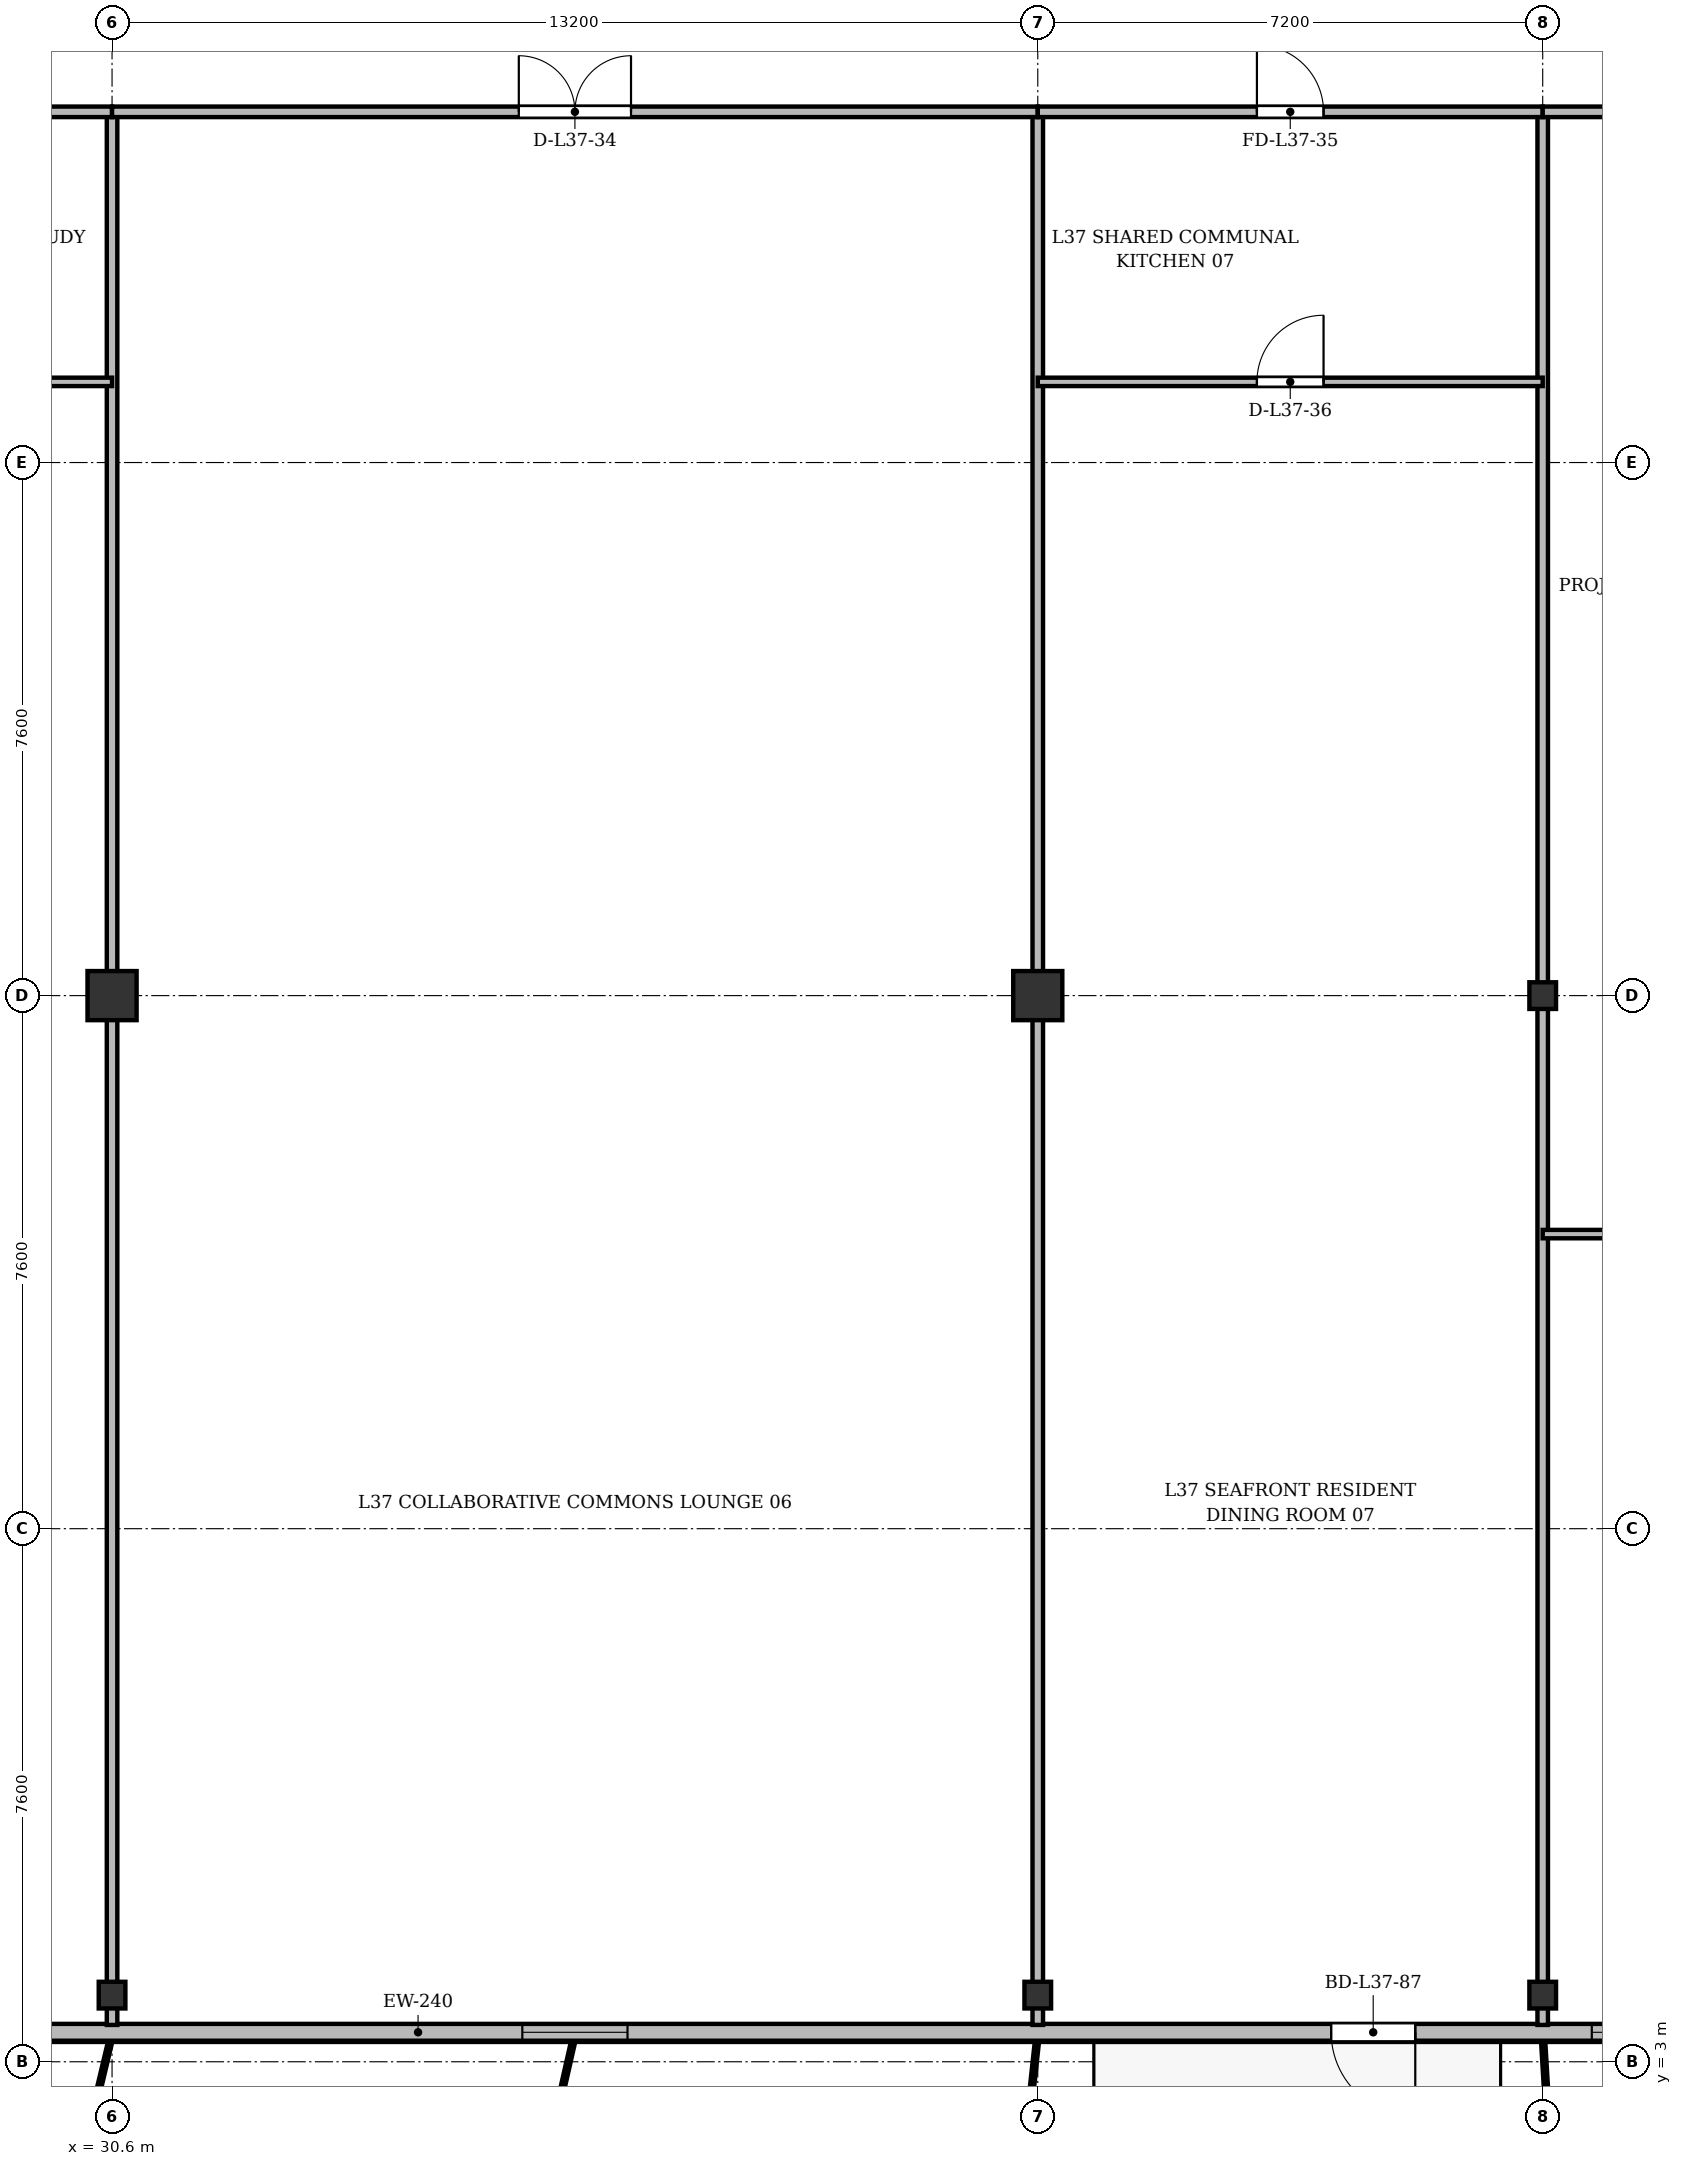
"""IFC4 building model, lengths in metres.
Left out: names, types, materials, properties, quantities, classifications, styles, units other than length and angle.
Written with IfcOpenShell. Run it as: python <this file> out.ifc"""

import sys

from ifc_helpers import new_model, si_unit, direction, frame, frame_2d, origin, origin_2d, place, context, subcontext, project, spatial, rectangle, i_section, extrude, source, transform, mapped, element, fill, save


model = new_model("IFC4")
c1 = context("Model", 3, precision=1e-05, world=origin(), true_north=direction((0.0, 1.0)))
c2 = subcontext(c1, "Body", "Model", "MODEL_VIEW")
j1 = project(units=[si_unit("LENGTHUNIT", "METRE"), si_unit("PLANEANGLEUNIT", "RADIAN")], contexts=[c1])
p1 = place(None, origin())
s1 = spatial("IfcSite", under=j1, at=p1, CompositionType="ELEMENT")
p2 = place(p1, origin())
s2 = spatial("IfcBuilding", under=s1, at=p2, CompositionType="ELEMENT")
p3 = place(p2, frame((0.0, 0.0, 142.9)))
s3 = spatial("IfcBuildingStorey", under=s2, at=p3, CompositionType="ELEMENT", Elevation=142.9)
m1 = source(origin(), c2, "Body", "SweptSolid", [
    extrude(i_section(OverallWidth=0.38, OverallDepth=0.38, WebThickness=0.02, FlangeThickness=0.03, at=origin_2d()), origin(), (0.0, 0.0, 1.0), 3.6),
])
p4 = place(p3, frame((30.6, 3.95, 0.0), z_axis=(0.0, 0.0, 1.0), x_axis=(1.0, 0.0, 0.0)))
e1 = element("IfcColumn", 1, at=p4, inside=s3, PredefinedType="COLUMN", context=c2, shape_type="MappedRepresentation", body=[
    mapped(m1, transform((0.0, 0.0, 0.0), x_axis=(1.0, 0.0, 0.0), y_axis=(0.0, 1.0, 0.0), z_axis=(0.0, 0.0, 1.0), scale=1.0)),
])
m2 = source(origin(), c2, "Body", "SweptSolid", [
    extrude(rectangle(XDim=0.7, YDim=0.7, at=origin_2d()), origin(), (0.0, 0.0, 1.0), 3.6),
])
p5 = place(p3, frame((30.6, 18.2, 0.0), z_axis=(0.0, 0.0, 1.0), x_axis=(1.0, 0.0, 0.0)))
e2 = element("IfcColumn", 2, at=p5, inside=s3, PredefinedType="COLUMN", context=c2, shape_type="MappedRepresentation", body=[
    mapped(m2, transform((0.0, 0.0, 0.0), x_axis=(1.0, 0.0, 0.0), y_axis=(0.0, 1.0, 0.0), z_axis=(0.0, 0.0, 1.0), scale=1.0)),
])
p6 = place(p3, frame((43.8, 3.95, 0.0), z_axis=(0.0, 0.0, 1.0), x_axis=(1.0, 0.0, 0.0)))
e3 = element("IfcColumn", 3, at=p6, inside=s3, PredefinedType="COLUMN", context=c2, shape_type="MappedRepresentation", body=[
    mapped(m1, transform((0.0, 0.0, 0.0), x_axis=(1.0, 0.0, 0.0), y_axis=(0.0, 1.0, 0.0), z_axis=(0.0, 0.0, 1.0), scale=1.0)),
])
p7 = place(p3, frame((43.8, 18.2, 0.0), z_axis=(0.0, 0.0, 1.0), x_axis=(1.0, 0.0, 0.0)))
e4 = element("IfcColumn", 4, at=p7, inside=s3, PredefinedType="COLUMN", context=c2, shape_type="MappedRepresentation", body=[
    mapped(m2, transform((0.0, 0.0, 0.0), x_axis=(1.0, 0.0, 0.0), y_axis=(0.0, 1.0, 0.0), z_axis=(0.0, 0.0, 1.0), scale=1.0)),
])
for number, where, z_axis, x_axis in (
    (5, (51.0, 3.95, 0.0), (0.0, 0.0, 1.0), (1.0, 0.0, 0.0)),
    (6, (51.0, 18.2, 0.0), (0.0, 0.0, 1.0), (1.0, 0.0, 0.0)),
):
    element("IfcColumn", number, at=place(p3, frame(where, z_axis=z_axis, x_axis=x_axis)), inside=s3, PredefinedType="COLUMN", context=c2, shape_type="MappedRepresentation", body=[
        mapped(m1, transform((0.0, 0.0, 0.0), x_axis=(1.0, 0.0, 0.0), y_axis=(0.0, 1.0, 0.0), z_axis=(0.0, 0.0, 1.0), scale=1.0)),
    ])
p8 = place(p3, frame((63.6, 3.42, 0.0), z_axis=(0.0, 0.0, 1.0), x_axis=(-1.0, 0.0, 0.0)))
e7 = element("IfcWall", 7, at=p8, inside=s3, PredefinedType="SOLIDWALL", context=c2, shape_type="SweptSolid", body=[
    extrude(rectangle(XDim=52.8, YDim=0.24, at=frame_2d((26.4, 0.0))), origin(), (0.0, 0.0, 1.0), 3.35),
])
p9 = place(p8, frame((1.695, 0.0, 0.9)))
e8 = element("IfcOpeningElement", 8, at=p9, cuts=e7, PredefinedType="OPENING", context=c2, shape_type="SweptSolid", body=[
    extrude(rectangle(XDim=1.5, YDim=1.75, at=frame_2d((0.75, 0.875))), frame((0.0, 0.13, 0.0), z_axis=(0.0, -1.0, 0.0), x_axis=(1.0, 0.0, 0.0)), (0.0, 0.0, 1.0), 0.26),
])
p10 = place(p8, frame((5.1, 0.0, 0.9)))
e9 = element("IfcOpeningElement", 9, at=p10, cuts=e7, PredefinedType="OPENING", context=c2, shape_type="SweptSolid", body=[
    extrude(rectangle(XDim=2.0, YDim=1.95, at=frame_2d((1.0, 0.975))), frame((0.0, 0.13, 0.0), z_axis=(0.0, -1.0, 0.0), x_axis=(1.0, 0.0, 0.0)), (0.0, 0.0, 1.0), 0.26),
])
p11 = place(p8, frame((7.65, 0.0, 0.9)))
e10 = element("IfcOpeningElement", 10, at=p11, cuts=e7, PredefinedType="OPENING", context=c2, shape_type="SweptSolid", body=[
    extrude(rectangle(XDim=1.5, YDim=1.75, at=frame_2d((0.75, 0.875))), frame((0.0, 0.13, 0.0), z_axis=(0.0, -1.0, 0.0), x_axis=(1.0, 0.0, 0.0)), (0.0, 0.0, 1.0), 0.26),
])
p12 = place(p8, frame((10.1, 0.0, 0.9)))
e11 = element("IfcOpeningElement", 11, at=p12, cuts=e7, PredefinedType="OPENING", context=c2, shape_type="SweptSolid", body=[
    extrude(rectangle(XDim=1.8, YDim=1.8, at=frame_2d((0.9, 0.9))), frame((0.0, 0.13, 0.0), z_axis=(0.0, -1.0, 0.0), x_axis=(1.0, 0.0, 0.0)), (0.0, 0.0, 1.0), 0.26),
])
p13 = place(p8, frame((14.417, 0.0, 0.0)))
e12 = element("IfcOpeningElement", 12, at=p13, cuts=e7, PredefinedType="OPENING", context=c2, shape_type="SweptSolid", body=[
    extrude(rectangle(XDim=1.2, YDim=2.2, at=frame_2d((0.6, 1.1))), frame((0.0, 0.13, 0.0), z_axis=(0.0, -1.0, 0.0), x_axis=(1.0, 0.0, 0.0)), (0.0, 0.0, 1.0), 0.26),
])
p14 = place(p8, frame((25.65, 0.0, 0.9)))
e13 = element("IfcOpeningElement", 13, at=p14, cuts=e7, PredefinedType="OPENING", context=c2, shape_type="SweptSolid", body=[
    extrude(rectangle(XDim=1.5, YDim=1.75, at=frame_2d((0.75, 0.875))), frame((0.0, 0.13, 0.0), z_axis=(0.0, -1.0, 0.0), x_axis=(1.0, 0.0, 0.0)), (0.0, 0.0, 1.0), 0.26),
])
p15 = place(p8, frame((35.6, 0.0, 0.9)))
e14 = element("IfcOpeningElement", 14, at=p15, cuts=e7, PredefinedType="OPENING", context=c2, shape_type="SweptSolid", body=[
    extrude(rectangle(XDim=2.0, YDim=1.95, at=frame_2d((1.0, 0.975))), frame((0.0, 0.13, 0.0), z_axis=(0.0, -1.0, 0.0), x_axis=(1.0, 0.0, 0.0)), (0.0, 0.0, 1.0), 0.26),
])
p16 = place(p8, frame((41.656, 0.0, 0.0)))
e15 = element("IfcOpeningElement", 15, at=p16, cuts=e7, PredefinedType="OPENING", context=c2, shape_type="SweptSolid", body=[
    extrude(rectangle(XDim=1.2, YDim=2.2, at=frame_2d((0.6, 1.1))), frame((0.0, 0.13, 0.0), z_axis=(0.0, -1.0, 0.0), x_axis=(1.0, 0.0, 0.0)), (0.0, 0.0, 1.0), 0.26),
])
p17 = place(p8, frame((43.65, 0.0, 0.9)))
e16 = element("IfcOpeningElement", 16, at=p17, cuts=e7, PredefinedType="OPENING", context=c2, shape_type="SweptSolid", body=[
    extrude(rectangle(XDim=1.5, YDim=1.75, at=frame_2d((0.75, 0.875))), frame((0.0, 0.13, 0.0), z_axis=(0.0, -1.0, 0.0), x_axis=(1.0, 0.0, 0.0)), (0.0, 0.0, 1.0), 0.26),
])
p18 = place(p8, frame((45.95, 0.0, 0.9)))
e17 = element("IfcOpeningElement", 17, at=p18, cuts=e7, PredefinedType="OPENING", context=c2, shape_type="SweptSolid", body=[
    extrude(rectangle(XDim=1.5, YDim=1.75, at=frame_2d((0.75, 0.875))), frame((0.0, 0.13, 0.0), z_axis=(0.0, -1.0, 0.0), x_axis=(1.0, 0.0, 0.0)), (0.0, 0.0, 1.0), 0.26),
])
p19 = place(p8, frame((49.605, 0.0, 0.9)))
e18 = element("IfcOpeningElement", 18, at=p19, cuts=e7, PredefinedType="OPENING", context=c2, shape_type="SweptSolid", body=[
    extrude(rectangle(XDim=1.5, YDim=1.75, at=frame_2d((0.75, 0.875))), frame((0.0, 0.13, 0.0), z_axis=(0.0, -1.0, 0.0), x_axis=(1.0, 0.0, 0.0)), (0.0, 0.0, 1.0), 0.26),
])
for number, where, z_axis, x_axis in (
    (19, (30.6, 3.525, 0.0), (0.0, 0.0, 1.0), (0.0, 1.0, 0.0)),
    (20, (43.8, 3.525, 0.0), (0.0, 0.0, 1.0), (0.0, 1.0, 0.0)),
    (21, (51.0, 3.525, 0.0), (0.0, 0.0, 1.0), (0.0, 1.0, 0.0)),
):
    element("IfcWall", number, at=place(p3, frame(where, z_axis=z_axis, x_axis=x_axis)), inside=s3, PredefinedType="PARTITIONING", context=c2, shape_type="SweptSolid", body=[
        extrude(rectangle(XDim=27.275, YDim=0.15, at=frame_2d((13.638, 0.0))), origin(), (0.0, 0.0, 1.0), 2.85),
    ])
p20 = place(p3, frame((23.4, 30.8, 0.0), z_axis=(0.0, 0.0, 1.0), x_axis=(1.0, 0.0, 0.0)))
e22 = element("IfcWall", 22, at=p20, inside=s3, PredefinedType="PARTITIONING", context=c2, shape_type="SweptSolid", body=[
    extrude(rectangle(XDim=7.2, YDim=0.15, at=frame_2d((3.6, 0.0))), origin(), (0.0, 0.0, 1.0), 2.85),
])
p21 = place(p20, frame((3.125, 0.0, 0.0)))
e23 = element("IfcOpeningElement", 23, at=p21, cuts=e22, PredefinedType="OPENING", context=c2, shape_type="SweptSolid", body=[
    extrude(rectangle(XDim=0.95, YDim=2.15, at=frame_2d((0.475, 1.075))), frame((0.0, 0.085, 0.0), z_axis=(0.0, -1.0, 0.0), x_axis=(1.0, 0.0, 0.0)), (0.0, 0.0, 1.0), 0.17),
])
p22 = place(p3, frame((23.4, 26.95, 0.0), z_axis=(0.0, 0.0, 1.0), x_axis=(1.0, 0.0, 0.0)))
e24 = element("IfcWall", 24, at=p22, inside=s3, PredefinedType="PARTITIONING", context=c2, shape_type="SweptSolid", body=[
    extrude(rectangle(XDim=7.2, YDim=0.12, at=frame_2d((3.6, 0.0))), origin(), (0.0, 0.0, 1.0), 2.85),
])
p23 = place(p22, frame((3.125, 0.0, 0.0)))
e25 = element("IfcOpeningElement", 25, at=p23, cuts=e24, PredefinedType="OPENING", context=c2, shape_type="SweptSolid", body=[
    extrude(rectangle(XDim=0.95, YDim=2.15, at=frame_2d((0.475, 1.075))), frame((0.0, 0.07, 0.0), z_axis=(0.0, -1.0, 0.0), x_axis=(1.0, 0.0, 0.0)), (0.0, 0.0, 1.0), 0.14),
])
p24 = place(p3, frame((30.6, 30.8, 0.0), z_axis=(0.0, 0.0, 1.0), x_axis=(1.0, 0.0, 0.0)))
e26 = element("IfcWall", 26, at=p24, inside=s3, PredefinedType="PARTITIONING", context=c2, shape_type="SweptSolid", body=[
    extrude(rectangle(XDim=13.2, YDim=0.15, at=frame_2d((6.6, 0.0))), origin(), (0.0, 0.0, 1.0), 2.85),
])
p25 = place(p24, frame((5.8, 0.0, 0.0)))
e27 = element("IfcOpeningElement", 27, at=p25, cuts=e26, PredefinedType="OPENING", context=c2, shape_type="SweptSolid", body=[
    extrude(rectangle(XDim=1.6, YDim=2.2, at=frame_2d((0.8, 1.1))), frame((0.0, 0.085, 0.0), z_axis=(0.0, -1.0, 0.0), x_axis=(1.0, 0.0, 0.0)), (0.0, 0.0, 1.0), 0.17),
])
p26 = place(p3, frame((43.8, 30.8, 0.0), z_axis=(0.0, 0.0, 1.0), x_axis=(1.0, 0.0, 0.0)))
e28 = element("IfcWall", 28, at=p26, inside=s3, PredefinedType="PARTITIONING", context=c2, shape_type="SweptSolid", body=[
    extrude(rectangle(XDim=7.2, YDim=0.15, at=frame_2d((3.6, 0.0))), origin(), (0.0, 0.0, 1.0), 2.85),
])
p27 = place(p26, frame((3.125, 0.0, 0.0)))
e29 = element("IfcOpeningElement", 29, at=p27, cuts=e28, PredefinedType="OPENING", context=c2, shape_type="SweptSolid", body=[
    extrude(rectangle(XDim=0.95, YDim=2.15, at=frame_2d((0.475, 1.075))), frame((0.0, 0.085, 0.0), z_axis=(0.0, -1.0, 0.0), x_axis=(1.0, 0.0, 0.0)), (0.0, 0.0, 1.0), 0.17),
])
p28 = place(p3, frame((43.8, 26.95, 0.0), z_axis=(0.0, 0.0, 1.0), x_axis=(1.0, 0.0, 0.0)))
e30 = element("IfcWall", 30, at=p28, inside=s3, PredefinedType="PARTITIONING", context=c2, shape_type="SweptSolid", body=[
    extrude(rectangle(XDim=7.2, YDim=0.12, at=frame_2d((3.6, 0.0))), origin(), (0.0, 0.0, 1.0), 2.85),
])
p29 = place(p28, frame((3.125, 0.0, 0.0)))
e31 = element("IfcOpeningElement", 31, at=p29, cuts=e30, PredefinedType="OPENING", context=c2, shape_type="SweptSolid", body=[
    extrude(rectangle(XDim=0.95, YDim=2.15, at=frame_2d((0.475, 1.075))), frame((0.0, 0.07, 0.0), z_axis=(0.0, -1.0, 0.0), x_axis=(1.0, 0.0, 0.0)), (0.0, 0.0, 1.0), 0.14),
])
p30 = place(p3, frame((51.0, 30.8, 0.0), z_axis=(0.0, 0.0, 1.0), x_axis=(1.0, 0.0, 0.0)))
e32 = element("IfcWall", 32, at=p30, inside=s3, PredefinedType="PARTITIONING", context=c2, shape_type="SweptSolid", body=[
    extrude(rectangle(XDim=3.2, YDim=0.15, at=frame_2d((1.6, 0.0))), origin(), (0.0, 0.0, 1.0), 2.85),
])
p31 = place(p30, frame((1.125, 0.0, 0.0)))
e33 = element("IfcOpeningElement", 33, at=p31, cuts=e32, PredefinedType="OPENING", context=c2, shape_type="SweptSolid", body=[
    extrude(rectangle(XDim=0.95, YDim=2.15, at=frame_2d((0.475, 1.075))), frame((0.0, 0.085, 0.0), z_axis=(0.0, -1.0, 0.0), x_axis=(1.0, 0.0, 0.0)), (0.0, 0.0, 1.0), 0.17),
])
p32 = place(p3, frame((51.0, 14.8, 0.0), z_axis=(0.0, 0.0, 1.0), x_axis=(1.0, 0.0, 0.0)))
e34 = element("IfcWall", 34, at=p32, inside=s3, PredefinedType="PARTITIONING", context=c2, shape_type="SweptSolid", body=[
    extrude(rectangle(XDim=3.2, YDim=0.12, at=frame_2d((1.6, 0.0))), origin(), (0.0, 0.0, 1.0), 2.85),
])
p33 = place(p32, frame((1.125, 0.0, 0.0)))
e35 = element("IfcOpeningElement", 35, at=p33, cuts=e34, PredefinedType="OPENING", context=c2, shape_type="SweptSolid", body=[
    extrude(rectangle(XDim=0.95, YDim=2.15, at=frame_2d((0.475, 1.075))), frame((0.0, 0.07, 0.0), z_axis=(0.0, -1.0, 0.0), x_axis=(1.0, 0.0, 0.0)), (0.0, 0.0, 1.0), 0.14),
])
m3 = source(origin(), c2, "Body", "SweptSolid", [
    extrude(rectangle(XDim=1.8, YDim=1.8, at=frame_2d((0.9, 0.9))), frame((0.0, 0.03, 0.0), z_axis=(0.0, -1.0, 0.0), x_axis=(1.0, 0.0, 0.0)), (0.0, 0.0, 1.0), 0.06),
])
p34 = place(p12, origin())
e36 = element("IfcWindow", 36, at=p34, inside=s3, PartitioningType="SINGLE_PANEL", PredefinedType="WINDOW", context=c2, shape_type="MappedRepresentation", body=[
    mapped(m3, transform((0.0, 0.0, 0.0), x_axis=(1.0, 0.0, 0.0), y_axis=(0.0, 1.0, 0.0), z_axis=(0.0, 0.0, 1.0), scale=1.0)),
])
fill(e11, e36)
m4 = source(origin(), c2, "Body", "SweptSolid", [
    extrude(rectangle(XDim=1.2, YDim=2.2, at=frame_2d((0.6, 1.1))), frame((0.0, 0.025, 0.0), z_axis=(0.0, -1.0, 0.0), x_axis=(1.0, 0.0, 0.0)), (0.0, 0.0, 1.0), 0.05),
])
p35 = place(p13, origin())
e37 = element("IfcDoor", 37, at=p35, inside=s3, OperationType="SINGLE_SWING_LEFT", PredefinedType="DOOR", context=c2, shape_type="MappedRepresentation", body=[
    mapped(m4, transform((0.0, 0.0, 0.0), x_axis=(1.0, 0.0, 0.0), y_axis=(0.0, 1.0, 0.0), z_axis=(0.0, 0.0, 1.0), scale=1.0)),
])
fill(e12, e37)
m5 = source(origin(), c2, "Body", "SweptSolid", [
    extrude(rectangle(XDim=1.5, YDim=1.75, at=frame_2d((0.75, 0.875))), frame((0.0, 0.03, 0.0), z_axis=(0.0, -1.0, 0.0), x_axis=(1.0, 0.0, 0.0)), (0.0, 0.0, 1.0), 0.06),
])
p36 = place(p14, origin())
e38 = element("IfcWindow", 38, at=p36, inside=s3, PartitioningType="SINGLE_PANEL", PredefinedType="WINDOW", context=c2, shape_type="MappedRepresentation", body=[
    mapped(m5, transform((0.0, 0.0, 0.0), x_axis=(1.0, 0.0, 0.0), y_axis=(0.0, 1.0, 0.0), z_axis=(0.0, 0.0, 1.0), scale=1.0)),
])
fill(e13, e38)
m6 = source(origin(), c2, "Body", "SweptSolid", [
    extrude(rectangle(XDim=1.6, YDim=2.2, at=frame_2d((0.8, 1.1))), frame((0.0, 0.025, 0.0), z_axis=(0.0, -1.0, 0.0), x_axis=(1.0, 0.0, 0.0)), (0.0, 0.0, 1.0), 0.05),
])
p37 = place(p25, origin())
e39 = element("IfcDoor", 39, at=p37, inside=s3, OperationType="DOUBLE_DOOR_SINGLE_SWING", PredefinedType="DOOR", context=c2, shape_type="MappedRepresentation", body=[
    mapped(m6, transform((0.0, 0.0, 0.0), x_axis=(1.0, 0.0, 0.0), y_axis=(0.0, 1.0, 0.0), z_axis=(0.0, 0.0, 1.0), scale=1.0)),
])
fill(e27, e39)
m7 = source(origin(), c2, "Body", "SweptSolid", [
    extrude(rectangle(XDim=0.95, YDim=2.15, at=frame_2d((0.475, 1.075))), frame((0.0, 0.025, 0.0), z_axis=(0.0, -1.0, 0.0), x_axis=(1.0, 0.0, 0.0)), (0.0, 0.0, 1.0), 0.05),
])
p38 = place(p27, origin())
e40 = element("IfcDoor", 40, at=p38, inside=s3, OperationType="SINGLE_SWING_LEFT", PredefinedType="DOOR", context=c2, shape_type="MappedRepresentation", body=[
    mapped(m7, transform((0.0, 0.0, 0.0), x_axis=(1.0, 0.0, 0.0), y_axis=(0.0, 1.0, 0.0), z_axis=(0.0, 0.0, 1.0), scale=1.0)),
])
fill(e29, e40)
p39 = place(p29, origin())
e41 = element("IfcDoor", 41, at=p39, inside=s3, OperationType="SINGLE_SWING_RIGHT", PredefinedType="DOOR", context=c2, shape_type="MappedRepresentation", body=[
    mapped(m7, transform((0.0, 0.0, 0.0), x_axis=(1.0, 0.0, 0.0), y_axis=(0.0, 1.0, 0.0), z_axis=(0.0, 0.0, 1.0), scale=1.0)),
])
fill(e31, e41)
save(model, sys.argv[1])
